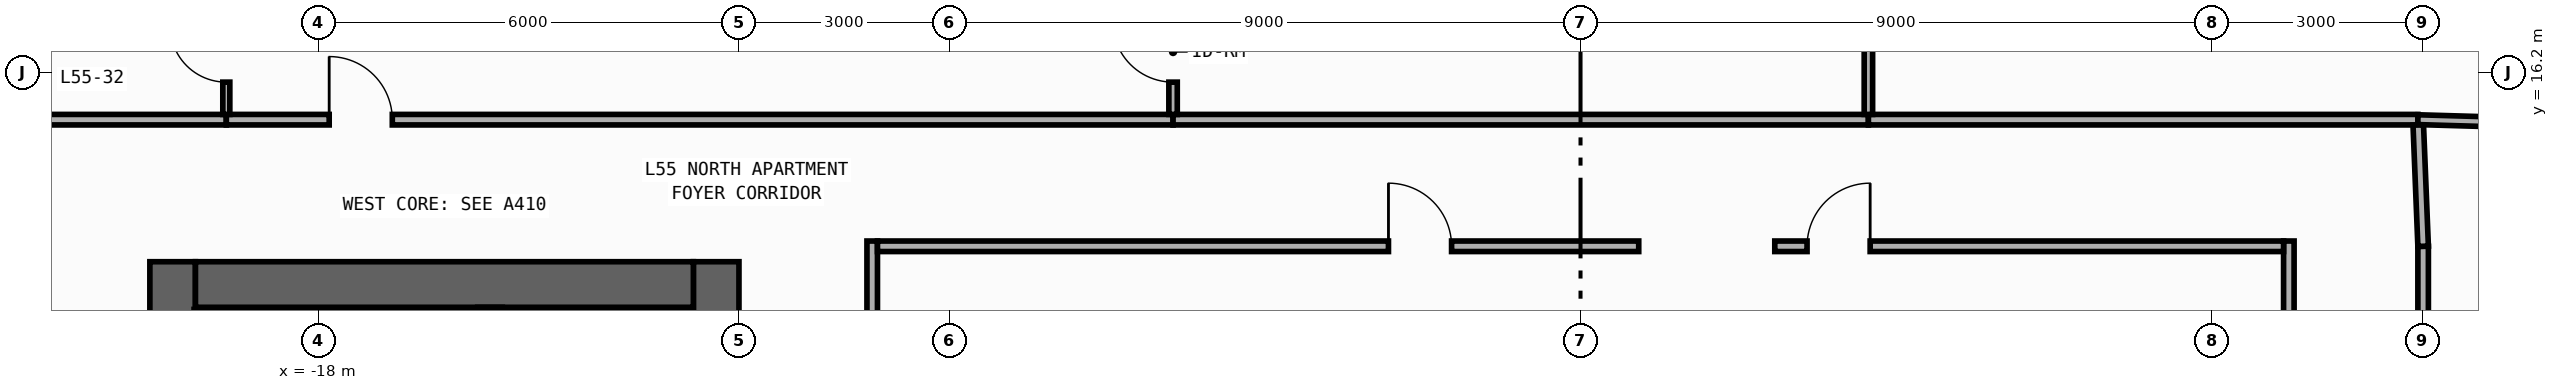
"""IFC4 building model, lengths in metres.
Left out: names, types, materials, properties, quantities, classifications, styles, units other than length and angle.
Written with IfcOpenShell. Run it as: python <this file> out.ifc"""

import sys

from ifc_helpers import new_model, si_unit, direction, frame, frame_2d, origin, place, context, subcontext, project, spatial, rectangle, extrude, element, fill, save


model = new_model("IFC4")
c1 = context("Model", 3, precision=1e-05, world=origin(), true_north=direction((0.0, 1.0)))
c2 = subcontext(c1, "Body", "Model", "MODEL_VIEW")
j1 = project(units=[si_unit("LENGTHUNIT", "METRE"), si_unit("PLANEANGLEUNIT", "RADIAN")], contexts=[c1])
p1 = place(None, origin())
s1 = spatial("IfcSite", under=j1, at=p1, CompositionType="ELEMENT")
p2 = place(p1, origin())
s2 = spatial("IfcBuilding", under=s1, at=p2, CompositionType="ELEMENT")
p3 = place(p2, frame((0.0, 0.0, 236.8)))
s3 = spatial("IfcBuildingStorey", under=s2, at=p3, CompositionType="ELEMENT", Elevation=236.8)
p4 = place(p3, frame((-20.075, -13.5, 0.0), z_axis=(0.0, 0.0, 1.0), x_axis=(0.0, 1.0, 0.0)))
e1 = element("IfcWall", 1, at=p4, inside=s3, PredefinedType="SHEAR", context=c2, shape_type="SweptSolid", body=[
    extrude(rectangle(XDim=27.0, YDim=0.65, at=frame_2d((13.5, 0.0))), origin(), (0.0, 0.0, 1.0), 3.34),
])
p5 = place(p3, frame((-12.325, -13.5, 0.0), z_axis=(0.0, 0.0, 1.0), x_axis=(0.0, 1.0, 0.0)))
e2 = element("IfcWall", 2, at=p5, inside=s3, PredefinedType="SHEAR", context=c2, shape_type="SweptSolid", body=[
    extrude(rectangle(XDim=27.0, YDim=0.65, at=frame_2d((13.5, 0.0))), origin(), (0.0, 0.0, 1.0), 3.34),
])
p6 = place(p5, frame((15.175, 0.0, 0.0)))
e3 = element("IfcOpeningElement", 3, at=p6, cuts=e2, PredefinedType="OPENING", context=c2, shape_type="SweptSolid", body=[
    extrude(rectangle(XDim=0.85, YDim=2.1, at=frame_2d((0.425, 1.05))), frame((0.0, 0.335, 0.0), z_axis=(0.0, -1.0, 0.0), x_axis=(1.0, 0.0, 0.0)), (0.0, 0.0, 1.0), 0.67),
])
p7 = place(p5, frame((21.275, 0.0, 0.0)))
e4 = element("IfcOpeningElement", 4, at=p7, cuts=e2, PredefinedType="OPENING", context=c2, shape_type="SweptSolid", body=[
    extrude(rectangle(XDim=0.85, YDim=2.1, at=frame_2d((0.425, 1.05))), frame((0.0, 0.335, 0.0), z_axis=(0.0, -1.0, 0.0), x_axis=(1.0, 0.0, 0.0)), (0.0, 0.0, 1.0), 0.67),
])
p8 = place(p5, frame((4.275, 0.0, 0.0)))
e5 = element("IfcOpeningElement", 5, at=p8, cuts=e2, PredefinedType="OPENING", context=c2, shape_type="SweptSolid", body=[
    extrude(rectangle(XDim=0.85, YDim=2.1, at=frame_2d((0.425, 1.05))), frame((0.0, 0.335, 0.0), z_axis=(0.0, -1.0, 0.0), x_axis=(1.0, 0.0, 0.0)), (0.0, 0.0, 1.0), 0.67),
])
p9 = place(p5, frame((10.275, 0.0, 0.0)))
e6 = element("IfcOpeningElement", 6, at=p9, cuts=e2, PredefinedType="OPENING", context=c2, shape_type="SweptSolid", body=[
    extrude(rectangle(XDim=0.85, YDim=2.1, at=frame_2d((0.425, 1.05))), frame((0.0, 0.335, 0.0), z_axis=(0.0, -1.0, 0.0), x_axis=(1.0, 0.0, 0.0)), (0.0, 0.0, 1.0), 0.67),
])
p10 = place(p5, frame((12.725, 0.0, 0.0)))
e7 = element("IfcOpeningElement", 7, at=p10, cuts=e2, PredefinedType="OPENING", context=c2, shape_type="SweptSolid", body=[
    extrude(rectangle(XDim=1.15, YDim=2.2, at=frame_2d((0.575, 1.1))), frame((0.0, 0.335, 0.0), z_axis=(0.0, -1.0, 0.0), x_axis=(1.0, 0.0, 0.0)), (0.0, 0.0, 1.0), 0.67),
])
p11 = place(p5, frame((1.625, 0.0, 0.0)))
e8 = element("IfcOpeningElement", 8, at=p11, cuts=e2, PredefinedType="OPENING", context=c2, shape_type="SweptSolid", body=[
    extrude(rectangle(XDim=0.85, YDim=2.1, at=frame_2d((0.425, 1.05))), frame((0.0, 0.335, 0.0), z_axis=(0.0, -1.0, 0.0), x_axis=(1.0, 0.0, 0.0)), (0.0, 0.0, 1.0), 0.67),
])
p12 = place(p3, frame((-19.75, 13.175, 0.0), z_axis=(0.0, 0.0, 1.0), x_axis=(1.0, 0.0, 0.0)))
e9 = element("IfcWall", 9, at=p12, inside=s3, PredefinedType="SHEAR", context=c2, shape_type="SweptSolid", body=[
    extrude(rectangle(XDim=7.1, YDim=0.65, at=frame_2d((3.55, 0.0))), origin(), (0.0, 0.0, 1.0), 3.34),
])
p13 = place(p3, frame((-15.55, -12.85, 0.0), z_axis=(0.0, 0.0, 1.0), x_axis=(0.0, 1.0, 0.0)))
e10 = element("IfcWall", 10, at=p13, inside=s3, PredefinedType="SHEAR", context=c2, shape_type="SweptSolid", body=[
    extrude(rectangle(XDim=25.7, YDim=0.35, at=frame_2d((12.85, 0.0))), origin(), (0.0, 0.0, 1.0), 3.34),
])
p14 = place(p13, frame((12.075, 0.0, 0.0)))
e11 = element("IfcOpeningElement", 11, at=p14, cuts=e10, PredefinedType="OPENING", context=c2, shape_type="SweptSolid", body=[
    extrude(rectangle(XDim=1.15, YDim=2.2, at=frame_2d((0.575, 1.1))), frame((0.0, 0.185, 0.0), z_axis=(0.0, -1.0, 0.0), x_axis=(1.0, 0.0, 0.0)), (0.0, 0.0, 1.0), 0.37),
])
p15 = place(p13, frame((0.975, 0.0, 0.0)))
e12 = element("IfcOpeningElement", 12, at=p15, cuts=e10, PredefinedType="OPENING", context=c2, shape_type="SweptSolid", body=[
    extrude(rectangle(XDim=0.85, YDim=2.1, at=frame_2d((0.425, 1.05))), frame((0.0, 0.185, 0.0), z_axis=(0.0, -1.0, 0.0), x_axis=(1.0, 0.0, 0.0)), (0.0, 0.0, 1.0), 0.37),
])
p16 = place(p3, frame((-19.77, 12.71, 0.0), z_axis=(0.0, 0.0, 1.0), x_axis=(1.0, 0.0, 0.0)))
e13 = element("IfcWall", 13, at=p16, inside=s3, PredefinedType="SHEAR", context=c2, shape_type="SweptSolid", body=[
    extrude(rectangle(XDim=4.065, YDim=0.22, at=frame_2d((2.032, 0.0))), origin(), (0.0, 0.0, 1.0), 3.34),
])
p17 = place(p3, frame((-10.1, 2.39, 0.0), z_axis=(0.0, 0.0, 1.0), x_axis=(0.0, 1.0, 0.0)))
e14 = element("IfcWall", 14, at=p17, inside=s3, PredefinedType="PARTITIONING", context=c2, shape_type="SweptSolid", body=[
    extrude(rectangle(XDim=11.405, YDim=0.15, at=frame_2d((5.703, 0.0))), origin(), (0.0, 0.0, 1.0), 3.34),
])
p18 = place(p17, frame((2.5, 0.0, 0.0)))
e15 = element("IfcOpeningElement", 15, at=p18, cuts=e14, PredefinedType="OPENING", context=c2, shape_type="SweptSolid", body=[
    extrude(rectangle(XDim=0.9, YDim=2.15, at=frame_2d((0.45, 1.075))), frame((0.0, 0.085, 0.0), z_axis=(0.0, -1.0, 0.0), x_axis=(1.0, 0.0, 0.0)), (0.0, 0.0, 1.0), 0.17),
])
p19 = place(p3, frame((12.015, 7.2, 0.0), z_axis=(0.0, 0.0, 1.0), x_axis=(0.0, 1.0, 0.0)))
e16 = element("IfcWall", 16, at=p19, inside=s3, PredefinedType="PARTITIONING", context=c2, shape_type="SweptSolid", body=[
    extrude(rectangle(XDim=6.52, YDim=0.15, at=frame_2d((3.26, 0.0))), origin(), (0.0, 0.0, 1.0), 3.34),
])
p20 = place(p19, frame((0.67, 0.0, 0.0)))
e17 = element("IfcOpeningElement", 17, at=p20, cuts=e16, PredefinedType="OPENING", context=c2, shape_type="SweptSolid", body=[
    extrude(rectangle(XDim=0.9, YDim=2.15, at=frame_2d((0.45, 1.075))), frame((0.0, 0.085, 0.0), z_axis=(0.0, -1.0, 0.0), x_axis=(1.0, 0.0, 0.0)), (0.0, 0.0, 1.0), 0.17),
])
p21 = place(p3, frame((10.1, 2.39, 0.0), z_axis=(0.0, 0.0, 1.0), x_axis=(0.0, 1.0, 0.0)))
e18 = element("IfcWall", 18, at=p21, inside=s3, PredefinedType="PARTITIONING", context=c2, shape_type="SweptSolid", body=[
    extrude(rectangle(XDim=11.405, YDim=0.15, at=frame_2d((5.703, 0.0))), origin(), (0.0, 0.0, 1.0), 3.34),
])
p22 = place(p21, frame((2.5, 0.0, 0.0)))
e19 = element("IfcOpeningElement", 19, at=p22, cuts=e18, PredefinedType="OPENING", context=c2, shape_type="SweptSolid", body=[
    extrude(rectangle(XDim=0.9, YDim=2.15, at=frame_2d((0.45, 1.075))), frame((0.0, 0.085, 0.0), z_axis=(0.0, -1.0, 0.0), x_axis=(1.0, 0.0, 0.0)), (0.0, 0.0, 1.0), 0.17),
])
p23 = place(p3, frame((-21.955, 15.525, 0.0), z_axis=(0.0, 0.0, 1.0), x_axis=(1.0, 0.0, 0.0)))
e20 = element("IfcWall", 20, at=p23, inside=s3, PredefinedType="PARTITIONING", context=c2, shape_type="SweptSolid", body=[
    extrude(rectangle(XDim=2.645, YDim=0.15, at=frame_2d((1.323, 0.0))), origin(), (0.0, 0.0, 1.0), 3.34),
])
p24 = place(p3, frame((-19.31, 15.525, 0.0), z_axis=(0.0, 0.0, 1.0), x_axis=(1.0, 0.0, 0.0)))
e21 = element("IfcWall", 21, at=p24, inside=s3, PredefinedType="PARTITIONING", context=c2, shape_type="SweptSolid", body=[
    extrude(rectangle(XDim=13.5, YDim=0.15, at=frame_2d((6.75, 0.0))), origin(), (0.0, 0.0, 1.0), 3.34),
])
p25 = place(p24, frame((1.467, 0.0, 0.0)))
e22 = element("IfcOpeningElement", 22, at=p25, cuts=e21, PredefinedType="OPENING", context=c2, shape_type="SweptSolid", body=[
    extrude(rectangle(XDim=0.9, YDim=2.15, at=frame_2d((0.45, 1.075))), frame((0.0, 0.085, 0.0), z_axis=(0.0, -1.0, 0.0), x_axis=(1.0, 0.0, 0.0)), (0.0, 0.0, 1.0), 0.17),
])
p26 = place(p3, frame((-5.81, 15.525, 0.0), z_axis=(0.0, 0.0, 1.0), x_axis=(1.0, 0.0, 0.0)))
e23 = element("IfcWall", 23, at=p26, inside=s3, PredefinedType="PARTITIONING", context=c2, shape_type="SweptSolid", body=[
    extrude(rectangle(XDim=9.915, YDim=0.15, at=frame_2d((4.958, 0.0))), origin(), (0.0, 0.0, 1.0), 3.34),
])
p27 = place(p3, frame((4.105, 15.525, 0.0), z_axis=(0.0, 0.0, 1.0), x_axis=(1.0, 0.0, 0.0)))
e24 = element("IfcWall", 24, at=p27, inside=s3, PredefinedType="PARTITIONING", context=c2, shape_type="SweptSolid", body=[
    extrude(rectangle(XDim=7.835, YDim=0.15, at=frame_2d((3.917, 0.0))), origin(), (0.0, 0.0, 1.0), 3.34),
])
p28 = place(p3, frame((12.015, 13.72, 0.0), z_axis=(0.0, 0.0, 1.0), x_axis=(-0.040046877756, 0.99919780203, 0.0)))
e25 = element("IfcWall", 25, at=p28, inside=s3, PredefinedType="PARTITIONING", context=c2, shape_type="SweptSolid", body=[
    extrude(rectangle(XDim=1.731, YDim=0.15, at=frame_2d((0.866, 0.0))), origin(), (0.0, 0.0, 1.0), 3.34),
])
p29 = place(p3, frame((-10.025, 13.72, 0.0), z_axis=(0.0, 0.0, 1.0), x_axis=(1.0, 0.0, 0.0)))
e26 = element("IfcWall", 26, at=p29, inside=s3, PredefinedType="PARTITIONING", context=c2, shape_type="SweptSolid", body=[
    extrude(rectangle(XDim=10.855, YDim=0.15, at=frame_2d((5.427, 0.0))), origin(), (0.0, 0.0, 1.0), 3.34),
])
p30 = place(p29, frame((7.286, 0.0, 0.0)))
e27 = element("IfcOpeningElement", 27, at=p30, cuts=e26, PredefinedType="OPENING", context=c2, shape_type="SweptSolid", body=[
    extrude(rectangle(XDim=0.9, YDim=2.15, at=frame_2d((0.45, 1.075))), frame((0.0, 0.085, 0.0), z_axis=(0.0, -1.0, 0.0), x_axis=(1.0, 0.0, 0.0)), (0.0, 0.0, 1.0), 0.17),
])
p31 = place(p3, frame((2.77, 13.72, 0.0), z_axis=(0.0, 0.0, 1.0), x_axis=(1.0, 0.0, 0.0)))
e28 = element("IfcWall", 28, at=p31, inside=s3, PredefinedType="PARTITIONING", context=c2, shape_type="SweptSolid", body=[
    extrude(rectangle(XDim=7.255, YDim=0.15, at=frame_2d((3.627, 0.0))), origin(), (0.0, 0.0, 1.0), 3.34),
])
p32 = place(p31, frame((0.46, 0.0, 0.0)))
e29 = element("IfcOpeningElement", 29, at=p32, cuts=e28, PredefinedType="OPENING", context=c2, shape_type="SweptSolid", body=[
    extrude(rectangle(XDim=0.9, YDim=2.15, at=frame_2d((0.45, 1.075))), frame((0.0, 0.085, 0.0), z_axis=(0.0, -1.0, 0.0), x_axis=(1.0, 0.0, 0.0)), (0.0, 0.0, 1.0), 0.17),
])
p33 = place(p3, frame((-19.31, 15.6, 0.0), z_axis=(0.0, 0.0, 1.0), x_axis=(0.0, 1.0, 0.0)))
e30 = element("IfcWall", 30, at=p33, inside=s3, PredefinedType="PARTITIONING", context=c2, shape_type="SweptSolid", body=[
    extrude(rectangle(XDim=2.5, YDim=0.1, at=frame_2d((1.25, 0.0))), origin(), (0.0, 0.0, 1.0), 3.34),
])
p34 = place(p33, frame((0.46, 0.0, 0.0)))
e31 = element("IfcOpeningElement", 31, at=p34, cuts=e30, PredefinedType="OPENING", context=c2, shape_type="SweptSolid", body=[
    extrude(rectangle(XDim=0.8, YDim=2.1, at=frame_2d((0.4, 1.05))), frame((0.0, 0.06, 0.0), z_axis=(0.0, -1.0, 0.0), x_axis=(1.0, 0.0, 0.0)), (0.0, 0.0, 1.0), 0.12),
])
p35 = place(p3, frame((-5.81, 15.6, 0.0), z_axis=(0.0, 0.0, 1.0), x_axis=(0.0, 1.0, 0.0)))
e32 = element("IfcWall", 32, at=p35, inside=s3, PredefinedType="PARTITIONING", context=c2, shape_type="SweptSolid", body=[
    extrude(rectangle(XDim=4.5, YDim=0.12, at=frame_2d((2.25, 0.0))), origin(), (0.0, 0.0, 1.0), 3.34),
])
p36 = place(p35, frame((0.46, 0.0, 0.0)))
e33 = element("IfcOpeningElement", 33, at=p36, cuts=e32, PredefinedType="OPENING", context=c2, shape_type="SweptSolid", body=[
    extrude(rectangle(XDim=0.86, YDim=2.15, at=frame_2d((0.43, 1.075))), frame((0.0, 0.07, 0.0), z_axis=(0.0, -1.0, 0.0), x_axis=(1.0, 0.0, 0.0)), (0.0, 0.0, 1.0), 0.14),
])
p37 = place(p3, frame((4.105, 15.6, 0.0), z_axis=(0.0, 0.0, 1.0), x_axis=(0.0, 1.0, 0.0)))
e34 = element("IfcWall", 34, at=p37, inside=s3, PredefinedType="PARTITIONING", context=c2, shape_type="SweptSolid", body=[
    extrude(rectangle(XDim=9.255, YDim=0.12, at=frame_2d((4.627, 0.0))), origin(), (0.0, 0.0, 1.0), 3.34),
])
p38 = place(p37, frame((7.995, 0.0, 0.0)))
e35 = element("IfcOpeningElement", 35, at=p38, cuts=e34, PredefinedType="OPENING", context=c2, shape_type="SweptSolid", body=[
    extrude(rectangle(XDim=0.8, YDim=2.1, at=frame_2d((0.4, 1.05))), frame((0.0, 0.07, 0.0), z_axis=(0.0, -1.0, 0.0), x_axis=(1.0, 0.0, 0.0)), (0.0, 0.0, 1.0), 0.14),
])
p39 = place(p3, frame((11.94, 15.525, 0.0), z_axis=(0.0, 0.0, 1.0), x_axis=(0.99958000177, -0.028979649098, 0.0)))
e36 = element("IfcWall", 36, at=p39, inside=s3, PredefinedType="PARTITIONING", context=c2, shape_type="SweptSolid", body=[
    extrude(rectangle(XDim=2.241, YDim=0.14, at=frame_2d((1.121, 0.0))), origin(), (0.0, 0.0, 1.0), 3.34),
])
p40 = place(p25, origin())
e37 = element("IfcDoor", 37, at=p40, inside=s3, OperationType="SINGLE_SWING_LEFT", PredefinedType="DOOR", context=c2, shape_type="SweptSolid", body=[
    extrude(rectangle(XDim=0.9, YDim=2.15, at=frame_2d((0.45, 1.075))), frame((0.0, 0.025, 0.0), z_axis=(0.0, -1.0, 0.0), x_axis=(1.0, 0.0, 0.0)), (0.0, 0.0, 1.0), 0.05),
])
fill(e22, e37)
p41 = place(p30, origin())
e38 = element("IfcDoor", 38, at=p41, inside=s3, OperationType="SINGLE_SWING_LEFT", PredefinedType="DOOR", context=c2, shape_type="SweptSolid", body=[
    extrude(rectangle(XDim=0.9, YDim=2.15, at=frame_2d((0.45, 1.075))), frame((0.0, 0.025, 0.0), z_axis=(0.0, -1.0, 0.0), x_axis=(1.0, 0.0, 0.0)), (0.0, 0.0, 1.0), 0.05),
])
fill(e27, e38)
p42 = place(p32, origin())
e39 = element("IfcDoor", 39, at=p42, inside=s3, OperationType="SINGLE_SWING_RIGHT", PredefinedType="DOOR", context=c2, shape_type="SweptSolid", body=[
    extrude(rectangle(XDim=0.9, YDim=2.15, at=frame_2d((0.45, 1.075))), frame((0.0, 0.025, 0.0), z_axis=(0.0, -1.0, 0.0), x_axis=(1.0, 0.0, 0.0)), (0.0, 0.0, 1.0), 0.05),
])
fill(e29, e39)
p43 = place(p34, origin())
e40 = element("IfcDoor", 40, at=p43, inside=s3, OperationType="SINGLE_SWING_RIGHT", PredefinedType="DOOR", context=c2, shape_type="SweptSolid", body=[
    extrude(rectangle(XDim=0.8, YDim=2.1, at=frame_2d((0.4, 1.05))), frame((0.0, 0.025, 0.0), z_axis=(0.0, -1.0, 0.0), x_axis=(1.0, 0.0, 0.0)), (0.0, 0.0, 1.0), 0.05),
])
fill(e31, e40)
p44 = place(p36, origin())
e41 = element("IfcDoor", 41, at=p44, inside=s3, OperationType="SINGLE_SWING_RIGHT", PredefinedType="DOOR", context=c2, shape_type="SweptSolid", body=[
    extrude(rectangle(XDim=0.86, YDim=2.15, at=frame_2d((0.43, 1.075))), frame((0.0, 0.025, 0.0), z_axis=(0.0, -1.0, 0.0), x_axis=(1.0, 0.0, 0.0)), (0.0, 0.0, 1.0), 0.05),
])
fill(e33, e41)
save(model, sys.argv[1])
